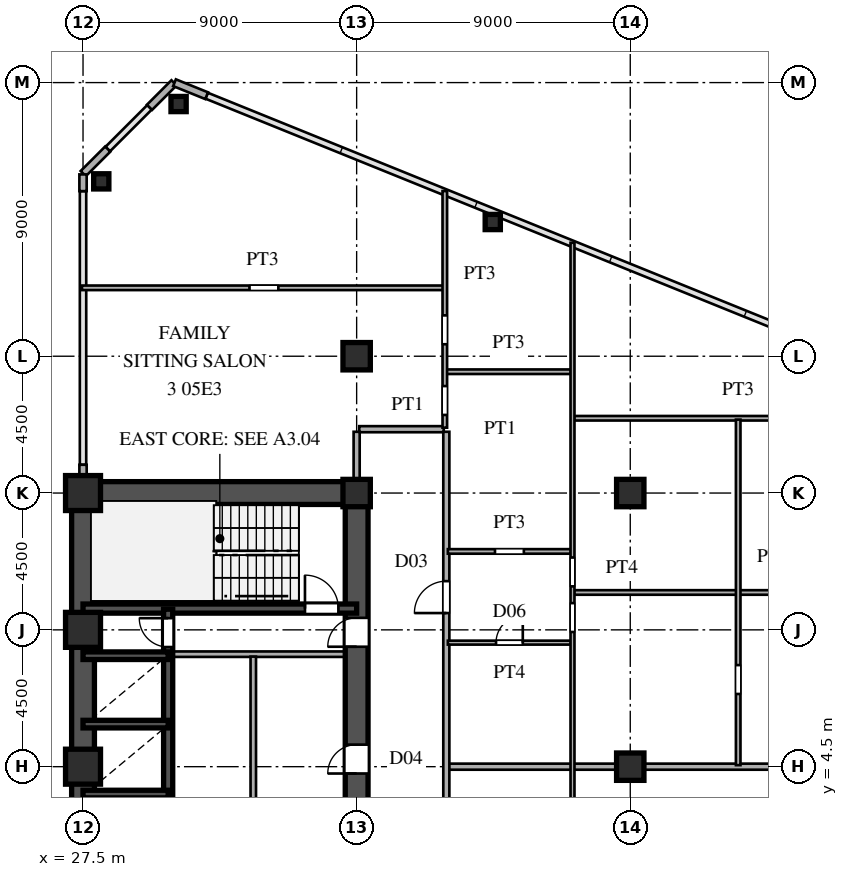
"""IFC4 building model, lengths in metres.
Left out: names, types, materials, properties, quantities, classifications, styles, units other than length and angle.
Written with IfcOpenShell. Run it as: python <this file> out.ifc"""

import sys

from ifc_helpers import new_model, si_unit, direction, frame, frame_2d, origin, origin_2d, place, context, subcontext, project, spatial, rectangle, hollow_rectangle, i_section, extrude, source, transform, mapped, element, fill, save


model = new_model("IFC4")
c1 = context("Model", 3, precision=1e-05, world=origin(), true_north=direction((0.0, 1.0)))
c2 = subcontext(c1, "Body", "Model", "MODEL_VIEW")
j1 = project(units=[si_unit("LENGTHUNIT", "METRE"), si_unit("PLANEANGLEUNIT", "RADIAN")], contexts=[c1])
p1 = place(None, origin())
s1 = spatial("IfcSite", under=j1, at=p1, CompositionType="ELEMENT")
p2 = place(p1, origin())
s2 = spatial("IfcBuilding", under=s1, at=p2, CompositionType="ELEMENT")
p3 = place(p2, frame((0.0, 0.0, 22.5)))
s3 = spatial("IfcBuildingStorey", under=s2, at=p3, CompositionType="ELEMENT", Elevation=22.5)
m1 = source(origin(), c2, "Body", "SweptSolid", [
    extrude(hollow_rectangle(XDim=1.15, YDim=1.15, WallThickness=0.048, at=origin_2d()), origin(), (0.0, 0.0, 1.0), 3.6),
])
for number, where, z_axis, x_axis in (
    (1, (27.5, 4.5, 0.0), (0.0, 0.0, 1.0), (1.0, 0.0, 0.0)),
    (2, (27.5, 9.0, 0.0), (0.0, 0.0, 1.0), (1.0, 0.0, 0.0)),
    (3, (27.5, 13.5, 0.0), (0.0, 0.0, 1.0), (1.0, 0.0, 0.0)),
):
    element("IfcColumn", number, at=place(p3, frame(where, z_axis=z_axis, x_axis=x_axis)), inside=s3, PredefinedType="COLUMN", context=c2, shape_type="MappedRepresentation", body=[
        mapped(m1, transform((0.0, 0.0, 0.0), scale=1.0)),
    ])
m2 = source(origin(), c2, "Body", "SweptSolid", [
    extrude(i_section(OverallWidth=0.9, OverallDepth=0.9, WebThickness=0.036, FlangeThickness=0.055, at=origin_2d()), origin(), (0.0, 0.0, 1.0), 3.6),
])
for number, where, z_axis, x_axis in (
    (4, (36.5, 13.5, 0.0), (0.0, 0.0, 1.0), (1.0, 0.0, 0.0)),
    (5, (36.5, 18.0, 0.0), (0.0, 0.0, 1.0), (1.0, 0.0, 0.0)),
    (6, (45.5, 4.5, 0.0), (0.0, 0.0, 1.0), (1.0, 0.0, 0.0)),
    (7, (45.5, 13.5, 0.0), (0.0, 0.0, 1.0), (1.0, 0.0, 0.0)),
):
    element("IfcColumn", number, at=place(p3, frame(where, z_axis=z_axis, x_axis=x_axis)), inside=s3, PredefinedType="COLUMN", context=c2, shape_type="MappedRepresentation", body=[
        mapped(m2, transform((0.0, 0.0, 0.0), scale=1.0)),
    ])
m3 = source(origin(), c2, "Body", "SweptSolid", [
    extrude(hollow_rectangle(XDim=0.5, YDim=0.5, WallThickness=0.02, at=origin_2d()), origin(), (0.0, 0.0, 1.0), 3.6),
])
for number, where, z_axis, x_axis in (
    (8, (30.643, 26.295, 0.0), (0.0, 0.0, 1.0), (1.0, 0.0, 0.0)),
    (9, (28.1, 23.751, 0.0), (0.0, 0.0, 1.0), (1.0, 0.0, 0.0)),
    (10, (40.977, 22.414, 0.0), (0.0, 0.0, 1.0), (1.0, 0.0, 0.0)),
):
    element("IfcColumn", number, at=place(p3, frame(where, z_axis=z_axis, x_axis=x_axis)), inside=s3, PredefinedType="COLUMN", context=c2, shape_type="MappedRepresentation", body=[
        mapped(m3, transform((0.0, 0.0, 0.0), scale=1.0)),
    ])
p4 = place(p3, frame((31.566, 26.569, 0.0), z_axis=(0.0, 0.0, 1.0), x_axis=(-0.927007103665, 0.375043770452, 0.0)))
e11 = element("IfcWall", 11, at=p4, inside=s3, PredefinedType="SOLIDWALL", context=c2, shape_type="SweptSolid", body=[
    extrude(rectangle(XDim=1.14, YDim=0.24, at=frame_2d((0.57, 0.0))), origin(), (0.0, 0.0, 1.0), 3.38),
])
for number, where, z_axis, x_axis in (
    (12, (30.493, 26.993, 0.0), (0.0, 0.0, 1.0), (-0.707, -0.707, 0.0)),
    (13, (28.313, 24.813, 0.0), (0.0, 0.0, 1.0), (-0.707, -0.707, 0.0)),
):
    element("IfcWall", number, at=place(p3, frame(where, z_axis=z_axis, x_axis=x_axis)), inside=s3, PredefinedType="SOLIDWALL", context=c2, shape_type="SweptSolid", body=[
        extrude(rectangle(XDim=1.14, YDim=0.24, at=frame_2d((0.57, 0.0))), origin(), (0.0, 0.0, 1.0), 3.38),
    ])
p5 = place(p3, frame((27.5, 13.88, 0.0), z_axis=(0.0, 0.0, 1.0), x_axis=(0.0, 1.0, 0.0)))
e14 = element("IfcWall", 14, at=p5, inside=s3, PredefinedType="SOLIDWALL", context=c2, shape_type="SweptSolid", body=[
    extrude(rectangle(XDim=0.55, YDim=0.24, at=frame_2d((0.275, 0.0))), origin(), (0.0, 0.0, 1.0), 2.88),
])
p6 = place(p3, frame((27.5, 23.43, 0.0), z_axis=(0.0, 0.0, 1.0), x_axis=(0.0, 1.0, 0.0)))
e15 = element("IfcWall", 15, at=p6, inside=s3, PredefinedType="SOLIDWALL", context=c2, shape_type="SweptSolid", body=[
    extrude(rectangle(XDim=0.55, YDim=0.24, at=frame_2d((0.275, 0.0))), origin(), (0.0, 0.0, 1.0), 3.38),
])
p7 = place(p3, frame((27.5, 1.3, 0.0), z_axis=(0.0, 0.0, 1.0), x_axis=(0.0, 1.0, 0.0)))
e16 = element("IfcWall", 16, at=p7, inside=s3, PredefinedType="SHEAR", context=c2, shape_type="SweptSolid", body=[
    extrude(rectangle(XDim=12.2, YDim=0.75, at=frame_2d((6.1, 0.0))), origin(), (0.0, 0.0, 1.0), 3.38),
])
p8 = place(p3, frame((27.5, 13.5, 0.0), z_axis=(0.0, 0.0, 1.0), x_axis=(1.0, 0.0, 0.0)))
e17 = element("IfcWall", 17, at=p8, inside=s3, PredefinedType="SHEAR", context=c2, shape_type="SweptSolid", body=[
    extrude(rectangle(XDim=9.0, YDim=0.75, at=frame_2d((4.5, 0.0))), origin(), (0.0, 0.0, 1.0), 3.38),
])
p9 = place(p3, frame((36.5, 8.2, 0.0), z_axis=(0.0, 0.0, 1.0), x_axis=(0.0, 1.0, 0.0)))
e18 = element("IfcWall", 18, at=p9, inside=s3, PredefinedType="SHEAR", context=c2, shape_type="SweptSolid", body=[
    extrude(rectangle(XDim=5.45, YDim=0.75, at=frame_2d((2.725, 0.0))), origin(), (0.0, 0.0, 1.0), 3.38),
])
p10 = place(p9, frame((0.245, 0.0, 0.0)))
e19 = element("IfcOpeningElement", 19, at=p10, cuts=e18, PredefinedType="OPENING", context=c2, shape_type="SweptSolid", body=[
    extrude(rectangle(XDim=0.95, YDim=2.15, at=frame_2d((0.475, 1.075))), frame((0.0, 0.385, 0.0), z_axis=(0.0, -1.0, 0.0), x_axis=(1.0, 0.0, 0.0)), (0.0, 0.0, 1.0), 0.77),
])
p11 = place(p3, frame((36.5, 1.3, 0.0), z_axis=(0.0, 0.0, 1.0), x_axis=(0.0, 1.0, 0.0)))
e20 = element("IfcWall", 20, at=p11, inside=s3, PredefinedType="SHEAR", context=c2, shape_type="SweptSolid", body=[
    extrude(rectangle(XDim=6.9, YDim=0.75, at=frame_2d((3.45, 0.0))), origin(), (0.0, 0.0, 1.0), 3.38),
])
p12 = place(p11, frame((2.975, 0.0, 0.0)))
e21 = element("IfcOpeningElement", 21, at=p12, cuts=e20, PredefinedType="OPENING", context=c2, shape_type="SweptSolid", body=[
    extrude(rectangle(XDim=0.95, YDim=2.15, at=frame_2d((0.475, 1.075))), frame((0.0, 0.385, 0.0), z_axis=(0.0, -1.0, 0.0), x_axis=(1.0, 0.0, 0.0)), (0.0, 0.0, 1.0), 0.77),
])
p13 = place(p3, frame((27.5, 9.7, 0.0), z_axis=(0.0, 0.0, 1.0), x_axis=(1.0, 0.0, 0.0)))
e22 = element("IfcWall", 22, at=p13, inside=s3, PredefinedType="SHEAR", context=c2, shape_type="SweptSolid", body=[
    extrude(rectangle(XDim=9.0, YDim=0.3, at=frame_2d((4.5, 0.0))), origin(), (0.0, 0.0, 1.0), 3.38),
])
p14 = place(p13, frame((7.3, 0.0, 0.0)))
e23 = element("IfcOpeningElement", 23, at=p14, cuts=e22, PredefinedType="OPENING", context=c2, shape_type="SweptSolid", body=[
    extrude(rectangle(XDim=1.1, YDim=2.2, at=frame_2d((0.55, 1.1))), frame((0.0, 0.16, 0.0), z_axis=(0.0, -1.0, 0.0), x_axis=(1.0, 0.0, 0.0)), (0.0, 0.0, 1.0), 0.32),
])
for number, where, z_axis, x_axis in (
    (24, (27.5, 3.6, 0.0), (0.0, 0.0, 1.0), (1.0, 0.0, 0.0)),
    (25, (27.5, 5.9, 0.0), (0.0, 0.0, 1.0), (1.0, 0.0, 0.0)),
    (26, (27.5, 8.15, 0.0), (0.0, 0.0, 1.0), (1.0, 0.0, 0.0)),
):
    element("IfcWall", number, at=place(p3, frame(where, z_axis=z_axis, x_axis=x_axis)), inside=s3, PredefinedType="SHEAR", context=c2, shape_type="SweptSolid", body=[
        extrude(rectangle(XDim=2.8, YDim=0.25, at=frame_2d((1.4, 0.0))), origin(), (0.0, 0.0, 1.0), 3.38),
    ])
p15 = place(p3, frame((30.3, 1.32, 0.0), z_axis=(0.0, 0.0, 1.0), x_axis=(0.0, 1.0, 0.0)))
e27 = element("IfcWall", 27, at=p15, inside=s3, PredefinedType="SHEAR", context=c2, shape_type="SweptSolid", body=[
    extrude(rectangle(XDim=2.28, YDim=0.3, at=frame_2d((1.14, 0.0))), origin(), (0.0, 0.0, 1.0), 3.38),
])
p16 = place(p3, frame((30.3, 3.6, 0.0), z_axis=(0.0, 0.0, 1.0), x_axis=(0.0, 1.0, 0.0)))
e28 = element("IfcWall", 28, at=p16, inside=s3, PredefinedType="SHEAR", context=c2, shape_type="SweptSolid", body=[
    extrude(rectangle(XDim=2.3, YDim=0.3, at=frame_2d((1.15, 0.0))), origin(), (0.0, 0.0, 1.0), 3.38),
])
p17 = place(p3, frame((30.3, 5.9, 0.0), z_axis=(0.0, 0.0, 1.0), x_axis=(0.0, 1.0, 0.0)))
e29 = element("IfcWall", 29, at=p17, inside=s3, PredefinedType="SHEAR", context=c2, shape_type="SweptSolid", body=[
    extrude(rectangle(XDim=2.25, YDim=0.3, at=frame_2d((1.125, 0.0))), origin(), (0.0, 0.0, 1.0), 3.38),
])
p18 = place(p3, frame((30.3, 8.15, 0.0), z_axis=(0.0, 0.0, 1.0), x_axis=(0.0, 1.0, 0.0)))
e30 = element("IfcWall", 30, at=p18, inside=s3, PredefinedType="SHEAR", context=c2, shape_type="SweptSolid", body=[
    extrude(rectangle(XDim=1.53, YDim=0.3, at=frame_2d((0.765, 0.0))), origin(), (0.0, 0.0, 1.0), 3.38),
])
p19 = place(p18, frame((0.285, 0.0, 0.0)))
e31 = element("IfcOpeningElement", 31, at=p19, cuts=e30, PredefinedType="OPENING", context=c2, shape_type="SweptSolid", body=[
    extrude(rectangle(XDim=0.95, YDim=2.15, at=frame_2d((0.475, 1.075))), frame((0.0, 0.16, 0.0), z_axis=(0.0, -1.0, 0.0), x_axis=(1.0, 0.0, 0.0)), (0.0, 0.0, 1.0), 0.32),
])
p20 = place(p3, frame((30.45, 8.2, 0.0), z_axis=(0.0, 0.0, 1.0), x_axis=(1.0, 0.0, 0.0)))
e32 = element("IfcWall", 32, at=p20, inside=s3, PredefinedType="PARTITIONING", context=c2, shape_type="SweptSolid", body=[
    extrude(rectangle(XDim=5.7, YDim=0.18, at=frame_2d((2.85, 0.0))), origin(), (0.0, 0.0, 1.0), 3.38),
])
p21 = place(p3, frame((33.1, 1.38, 0.0), z_axis=(0.0, 0.0, 1.0), x_axis=(0.0, 1.0, 0.0)))
e33 = element("IfcWall", 33, at=p21, inside=s3, PredefinedType="PARTITIONING", context=c2, shape_type="SweptSolid", body=[
    extrude(rectangle(XDim=6.74, YDim=0.18, at=frame_2d((3.37, 0.0))), origin(), (0.0, 0.0, 1.0), 3.38),
])
p22 = place(p3, frame((39.53, 4.5, 0.0), z_axis=(0.0, 0.0, 1.0), x_axis=(1.0, 0.0, 0.0)))
e34 = element("IfcWall", 34, at=p22, inside=s3, PredefinedType="PARTITIONING", context=c2, shape_type="SweptSolid", body=[
    extrude(rectangle(XDim=14.99, YDim=0.2, at=frame_2d((7.495, 0.0))), origin(), (0.0, 0.0, 1.0), 2.68),
])
p23 = place(p3, frame((39.5, 8.58, 0.0), z_axis=(0.0, 0.0, 1.0), x_axis=(1.0, 0.0, 0.0)))
e35 = element("IfcWall", 35, at=p23, inside=s3, PredefinedType="PARTITIONING", context=c2, shape_type="SweptSolid", body=[
    extrude(rectangle(XDim=4.05, YDim=0.13, at=frame_2d((2.025, 0.0))), origin(), (0.0, 0.0, 1.0), 3.38),
])
p24 = place(p23, frame((1.585, 0.0, 0.0)))
e36 = element("IfcOpeningElement", 36, at=p24, cuts=e35, PredefinedType="OPENING", context=c2, shape_type="SweptSolid", body=[
    extrude(rectangle(XDim=0.88, YDim=2.1, at=frame_2d((0.44, 1.05))), frame((0.0, 0.075, 0.0), z_axis=(0.0, -1.0, 0.0), x_axis=(1.0, 0.0, 0.0)), (0.0, 0.0, 1.0), 0.15),
])
p25 = place(p3, frame((43.65, 10.23, 0.0), z_axis=(0.0, 0.0, 1.0), x_axis=(1.0, 0.0, 0.0)))
e37 = element("IfcWall", 37, at=p25, inside=s3, PredefinedType="PARTITIONING", context=c2, shape_type="SweptSolid", body=[
    extrude(rectangle(XDim=27.949, YDim=0.15, at=frame_2d((13.974, 0.0))), origin(), (0.0, 0.0, 1.0), 3.38),
])
p26 = place(p25, frame((21.938, 0.0, 0.0)))
e38 = element("IfcOpeningElement", 38, at=p26, cuts=e37, PredefinedType="OPENING", context=c2, shape_type="SweptSolid", body=[
    extrude(rectangle(XDim=0.95, YDim=2.15, at=frame_2d((0.475, 1.075))), frame((0.0, 0.085, 0.0), z_axis=(0.0, -1.0, 0.0), x_axis=(1.0, 0.0, 0.0)), (0.0, 0.0, 1.0), 0.17),
])
p27 = place(p25, frame((13.225, 0.0, 0.0)))
e39 = element("IfcOpeningElement", 39, at=p27, cuts=e37, PredefinedType="OPENING", context=c2, shape_type="SweptSolid", body=[
    extrude(rectangle(XDim=0.95, YDim=2.15, at=frame_2d((0.475, 1.075))), frame((0.0, 0.085, 0.0), z_axis=(0.0, -1.0, 0.0), x_axis=(1.0, 0.0, 0.0)), (0.0, 0.0, 1.0), 0.17),
])
p28 = place(p25, frame((7.65, 0.0, 0.0)))
e40 = element("IfcOpeningElement", 40, at=p28, cuts=e37, PredefinedType="OPENING", context=c2, shape_type="SweptSolid", body=[
    extrude(rectangle(XDim=0.95, YDim=2.15, at=frame_2d((0.475, 1.075))), frame((0.0, 0.085, 0.0), z_axis=(0.0, -1.0, 0.0), x_axis=(1.0, 0.0, 0.0)), (0.0, 0.0, 1.0), 0.17),
])
p29 = place(p3, frame((39.5, 11.58, 0.0), z_axis=(0.0, 0.0, 1.0), x_axis=(1.0, 0.0, 0.0)))
e41 = element("IfcWall", 41, at=p29, inside=s3, PredefinedType="PARTITIONING", context=c2, shape_type="SweptSolid", body=[
    extrude(rectangle(XDim=4.05, YDim=0.15, at=frame_2d((2.025, 0.0))), origin(), (0.0, 0.0, 1.0), 3.38),
])
p30 = place(p29, frame((1.55, 0.0, 0.0)))
e42 = element("IfcOpeningElement", 42, at=p30, cuts=e41, PredefinedType="OPENING", context=c2, shape_type="SweptSolid", body=[
    extrude(rectangle(XDim=0.95, YDim=2.15, at=frame_2d((0.475, 1.075))), frame((0.0, 0.085, 0.0), z_axis=(0.0, -1.0, 0.0), x_axis=(1.0, 0.0, 0.0)), (0.0, 0.0, 1.0), 0.17),
])
p31 = place(p3, frame((36.585, 15.6, 0.0), z_axis=(0.0, 0.0, 1.0), x_axis=(1.0, 0.0, 0.0)))
e43 = element("IfcWall", 43, at=p31, inside=s3, PredefinedType="PARTITIONING", context=c2, shape_type="SweptSolid", body=[
    extrude(rectangle(XDim=2.78, YDim=0.2, at=frame_2d((1.39, 0.0))), origin(), (0.0, 0.0, 1.0), 3.38),
])
p32 = place(p3, frame((43.65, 15.96, 0.0), z_axis=(0.0, 0.0, 1.0), x_axis=(1.0, 0.0, 0.0)))
e44 = element("IfcWall", 44, at=p32, inside=s3, PredefinedType="PARTITIONING", context=c2, shape_type="SweptSolid", body=[
    extrude(rectangle(XDim=10.8, YDim=0.15, at=frame_2d((5.4, 0.0))), origin(), (0.0, 0.0, 1.0), 3.38),
])
p33 = place(p32, frame((7.65, 0.0, 0.0)))
e45 = element("IfcOpeningElement", 45, at=p33, cuts=e44, PredefinedType="OPENING", context=c2, shape_type="SweptSolid", body=[
    extrude(rectangle(XDim=0.95, YDim=2.15, at=frame_2d((0.475, 1.075))), frame((0.0, 0.085, 0.0), z_axis=(0.0, -1.0, 0.0), x_axis=(1.0, 0.0, 0.0)), (0.0, 0.0, 1.0), 0.17),
])
p34 = place(p3, frame((39.45, 17.49, 0.0), z_axis=(0.0, 0.0, 1.0), x_axis=(1.0, 0.0, 0.0)))
e46 = element("IfcWall", 46, at=p34, inside=s3, PredefinedType="PARTITIONING", context=c2, shape_type="SweptSolid", body=[
    extrude(rectangle(XDim=4.1, YDim=0.15, at=frame_2d((2.05, 0.0))), origin(), (0.0, 0.0, 1.0), 3.38),
])
p35 = place(p3, frame((27.465, 20.25, 0.0), z_axis=(0.0, 0.0, 1.0), x_axis=(1.0, 0.0, 0.0)))
e47 = element("IfcWall", 47, at=p35, inside=s3, PredefinedType="PARTITIONING", context=c2, shape_type="SweptSolid", body=[
    extrude(rectangle(XDim=11.885, YDim=0.15, at=frame_2d((5.942, 0.0))), origin(), (0.0, 0.0, 1.0), 3.38),
])
p36 = place(p35, frame((5.51, 0.0, 0.0)))
e48 = element("IfcOpeningElement", 48, at=p36, cuts=e47, PredefinedType="OPENING", context=c2, shape_type="SweptSolid", body=[
    extrude(rectangle(XDim=0.95, YDim=2.15, at=frame_2d((0.475, 1.075))), frame((0.0, 0.085, 0.0), z_axis=(0.0, -1.0, 0.0), x_axis=(1.0, 0.0, 0.0)), (0.0, 0.0, 1.0), 0.17),
])
p37 = place(p3, frame((36.5, 13.88, 0.0), z_axis=(0.0, 0.0, 1.0), x_axis=(0.0, 1.0, 0.0)))
e49 = element("IfcWall", 49, at=p37, inside=s3, PredefinedType="PARTITIONING", context=c2, shape_type="SweptSolid", body=[
    extrude(rectangle(XDim=1.635, YDim=0.2, at=frame_2d((0.817, 0.0))), origin(), (0.0, 0.0, 1.0), 2.68),
])
p38 = place(p3, frame((39.4, 15.65, 0.0), z_axis=(0.0, 0.0, 1.0), x_axis=(0.0, 1.0, 0.0)))
e50 = element("IfcWall", 50, at=p38, inside=s3, PredefinedType="PARTITIONING", context=c2, shape_type="SweptSolid", body=[
    extrude(rectangle(XDim=7.783, YDim=0.15, at=frame_2d((3.892, 0.0))), origin(), (0.0, 0.0, 1.0), 3.38),
])
p39 = place(p38, frame((0.419, 0.0, 0.0)))
e51 = element("IfcOpeningElement", 51, at=p39, cuts=e50, PredefinedType="OPENING", context=c2, shape_type="SweptSolid", body=[
    extrude(rectangle(XDim=0.95, YDim=2.15, at=frame_2d((0.475, 1.075))), frame((0.0, 0.085, 0.0), z_axis=(0.0, -1.0, 0.0), x_axis=(1.0, 0.0, 0.0)), (0.0, 0.0, 1.0), 0.17),
])
p40 = place(p38, frame((2.744, 0.0, 0.0)))
e52 = element("IfcOpeningElement", 52, at=p40, cuts=e50, PredefinedType="OPENING", context=c2, shape_type="SweptSolid", body=[
    extrude(rectangle(XDim=0.95, YDim=2.15, at=frame_2d((0.475, 1.075))), frame((0.0, 0.085, 0.0), z_axis=(0.0, -1.0, 0.0), x_axis=(1.0, 0.0, 0.0)), (0.0, 0.0, 1.0), 0.17),
])
p41 = place(p3, frame((39.45, -15.515, 0.0), z_axis=(0.0, 0.0, 1.0), x_axis=(0.0, 1.0, 0.0)))
e53 = element("IfcWall", 53, at=p41, inside=s3, PredefinedType="PARTITIONING", context=c2, shape_type="SweptSolid", body=[
    extrude(rectangle(XDim=31.03, YDim=0.2, at=frame_2d((15.515, 0.0))), origin(), (0.0, 0.0, 1.0), 3.38),
])
p42 = place(p41, frame((1.345, 0.0, 0.0)))
e54 = element("IfcOpeningElement", 54, at=p42, cuts=e53, PredefinedType="OPENING", context=c2, shape_type="SweptSolid", body=[
    extrude(rectangle(XDim=1.05, YDim=2.25, at=frame_2d((0.525, 1.125))), frame((0.0, 0.11, 0.0), z_axis=(0.0, -1.0, 0.0), x_axis=(1.0, 0.0, 0.0)), (0.0, 0.0, 1.0), 0.22),
])
p43 = place(p41, frame((12.28, 0.0, 0.0)))
e55 = element("IfcOpeningElement", 55, at=p43, cuts=e53, PredefinedType="OPENING", context=c2, shape_type="SweptSolid", body=[
    extrude(rectangle(XDim=1.05, YDim=2.25, at=frame_2d((0.525, 1.125))), frame((0.0, 0.11, 0.0), z_axis=(0.0, -1.0, 0.0), x_axis=(1.0, 0.0, 0.0)), (0.0, 0.0, 1.0), 0.22),
])
p44 = place(p41, frame((25.067, 0.0, 0.0)))
e56 = element("IfcOpeningElement", 56, at=p44, cuts=e53, PredefinedType="OPENING", context=c2, shape_type="SweptSolid", body=[
    extrude(rectangle(XDim=1.05, YDim=2.25, at=frame_2d((0.525, 1.125))), frame((0.0, 0.11, 0.0), z_axis=(0.0, -1.0, 0.0), x_axis=(1.0, 0.0, 0.0)), (0.0, 0.0, 1.0), 0.22),
])
p45 = place(p3, frame((43.6, 0.352, 0.0), z_axis=(0.0, 0.0, 1.0), x_axis=(0.0, 1.0, 0.0)))
e57 = element("IfcWall", 57, at=p45, inside=s3, PredefinedType="PARTITIONING", context=c2, shape_type="SweptSolid", body=[
    extrude(rectangle(XDim=21.381, YDim=0.13, at=frame_2d((10.69, 0.0))), origin(), (0.0, 0.0, 1.0), 3.38),
])
p46 = place(p45, frame((8.578, 0.0, 0.0)))
e58 = element("IfcOpeningElement", 58, at=p46, cuts=e57, PredefinedType="OPENING", context=c2, shape_type="SweptSolid", body=[
    extrude(rectangle(XDim=0.95, YDim=2.15, at=frame_2d((0.475, 1.075))), frame((0.0, 0.075, 0.0), z_axis=(0.0, -1.0, 0.0), x_axis=(1.0, 0.0, 0.0)), (0.0, 0.0, 1.0), 0.15),
])
p47 = place(p45, frame((10.078, 0.0, 0.0)))
e59 = element("IfcOpeningElement", 59, at=p47, cuts=e57, PredefinedType="OPENING", context=c2, shape_type="SweptSolid", body=[
    extrude(rectangle(XDim=0.95, YDim=2.15, at=frame_2d((0.475, 1.075))), frame((0.0, 0.075, 0.0), z_axis=(0.0, -1.0, 0.0), x_axis=(1.0, 0.0, 0.0)), (0.0, 0.0, 1.0), 0.15),
])
p48 = place(p3, frame((49.05, 4.55, 0.0), z_axis=(0.0, 0.0, 1.0), x_axis=(0.0, 1.0, 0.0)))
e60 = element("IfcWall", 60, at=p48, inside=s3, PredefinedType="PARTITIONING", context=c2, shape_type="SweptSolid", body=[
    extrude(rectangle(XDim=11.365, YDim=0.15, at=frame_2d((5.683, 0.0))), origin(), (0.0, 0.0, 1.0), 3.38),
])
p49 = place(p48, frame((2.341, 0.0, 0.0)))
e61 = element("IfcOpeningElement", 61, at=p49, cuts=e60, PredefinedType="OPENING", context=c2, shape_type="SweptSolid", body=[
    extrude(rectangle(XDim=0.95, YDim=2.15, at=frame_2d((0.475, 1.075))), frame((0.0, 0.085, 0.0), z_axis=(0.0, -1.0, 0.0), x_axis=(1.0, 0.0, 0.0)), (0.0, 0.0, 1.0), 0.17),
])
m4 = source(origin(), c2, "Body", "SweptSolid", [
    extrude(rectangle(XDim=0.95, YDim=2.15, at=frame_2d((0.475, 1.075))), frame((0.0, 0.025, 0.0), z_axis=(0.0, -1.0, 0.0), x_axis=(1.0, 0.0, 0.0)), (0.0, 0.0, 1.0), 0.05),
])
p50 = place(p10, origin())
e62 = element("IfcDoor", 62, at=p50, inside=s3, OperationType="SINGLE_SWING_LEFT", PredefinedType="DOOR", context=c2, shape_type="MappedRepresentation", body=[
    mapped(m4, transform((0.0, 0.0, 0.0), scale=1.0)),
])
fill(e19, e62)
p51 = place(p12, origin())
e63 = element("IfcDoor", 63, at=p51, inside=s3, OperationType="SINGLE_SWING_LEFT", PredefinedType="DOOR", context=c2, shape_type="MappedRepresentation", body=[
    mapped(m4, transform((0.0, 0.0, 0.0), scale=1.0)),
])
fill(e21, e63)
m5 = source(origin(), c2, "Body", "SweptSolid", [
    extrude(rectangle(XDim=1.1, YDim=2.2, at=frame_2d((0.55, 1.1))), frame((0.0, 0.025, 0.0), z_axis=(0.0, -1.0, 0.0), x_axis=(1.0, 0.0, 0.0)), (0.0, 0.0, 1.0), 0.05),
])
p52 = place(p14, origin())
e64 = element("IfcDoor", 64, at=p52, inside=s3, OperationType="SINGLE_SWING_LEFT", PredefinedType="DOOR", context=c2, shape_type="MappedRepresentation", body=[
    mapped(m5, transform((0.0, 0.0, 0.0), scale=1.0)),
])
fill(e23, e64)
p53 = place(p19, origin())
e65 = element("IfcDoor", 65, at=p53, inside=s3, OperationType="SINGLE_SWING_RIGHT", PredefinedType="DOOR", context=c2, shape_type="MappedRepresentation", body=[
    mapped(m4, transform((0.0, 0.0, 0.0), scale=1.0)),
])
fill(e31, e65)
m6 = source(origin(), c2, "Body", "SweptSolid", [
    extrude(rectangle(XDim=0.88, YDim=2.1, at=frame_2d((0.44, 1.05))), frame((0.0, 0.025, 0.0), z_axis=(0.0, -1.0, 0.0), x_axis=(1.0, 0.0, 0.0)), (0.0, 0.0, 1.0), 0.05),
])
p54 = place(p24, origin())
e66 = element("IfcDoor", 66, at=p54, inside=s3, OperationType="SINGLE_SWING_RIGHT", PredefinedType="DOOR", context=c2, shape_type="MappedRepresentation", body=[
    mapped(m6, transform((0.0, 0.0, 0.0), scale=1.0)),
])
fill(e36, e66)
m7 = source(origin(), c2, "Body", "SweptSolid", [
    extrude(rectangle(XDim=1.05, YDim=2.25, at=frame_2d((0.525, 1.125))), frame((0.0, 0.025, 0.0), z_axis=(0.0, -1.0, 0.0), x_axis=(1.0, 0.0, 0.0)), (0.0, 0.0, 1.0), 0.05),
])
p55 = place(p44, origin())
e67 = element("IfcDoor", 67, at=p55, inside=s3, OperationType="SINGLE_SWING_LEFT", PredefinedType="DOOR", context=c2, shape_type="MappedRepresentation", body=[
    mapped(m7, transform((0.0, 0.0, 0.0), scale=1.0)),
])
fill(e56, e67)
save(model, sys.argv[1])
